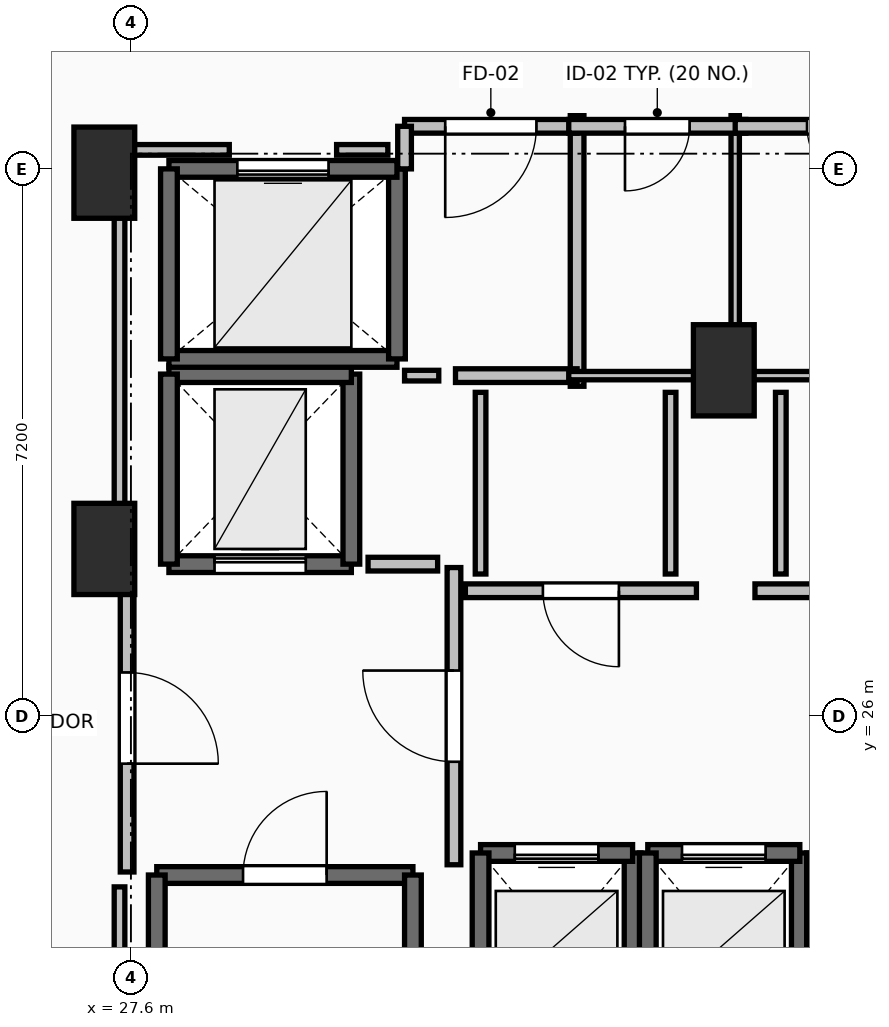
"""IFC4 building model, lengths in metres.
Left out: names, types, materials, properties, quantities, classifications, styles, units other than length and angle.
Written with IfcOpenShell. Run it as: python <this file> out.ifc"""

import sys

from ifc_helpers import new_model, si_unit, direction, frame, frame_2d, origin, origin_2d, place, context, subcontext, project, spatial, rectangle, extrude, element, fill, save


model = new_model("IFC4")
c1 = context("Model", 3, precision=1e-05, world=origin(), true_north=direction((0.0, 1.0)))
c2 = subcontext(c1, "Body", "Model", "MODEL_VIEW")
j1 = project(units=[si_unit("LENGTHUNIT", "METRE"), si_unit("PLANEANGLEUNIT", "RADIAN")], contexts=[c1])
p1 = place(None, origin())
s1 = spatial("IfcSite", under=j1, at=p1, CompositionType="ELEMENT")
p2 = place(p1, origin())
s2 = spatial("IfcBuilding", under=s1, at=p2, CompositionType="ELEMENT")
p3 = place(p2, frame((0.0, 0.0, 157.1)))
s3 = spatial("IfcBuildingStorey", under=s2, at=p3, CompositionType="ELEMENT", Elevation=157.1)
for number, where, z_axis, x_axis in (
    (1, (27.25, 28.2, 0.0), (0.0, 0.0, 1.0), (1.0, 0.0, 0.0)),
    (2, (27.25, 33.15, 0.0), (0.0, 0.0, 1.0), (1.0, 0.0, 0.0)),
    (3, (35.4, 30.55, 0.0), (0.0, 0.0, 1.0), (1.0, 0.0, 0.0)),
):
    element("IfcColumn", number, at=place(p3, frame(where, z_axis=z_axis, x_axis=x_axis)), inside=s3, PredefinedType="PILASTER", context=c2, shape_type="SweptSolid", body=[
        extrude(rectangle(XDim=0.8, YDim=1.2, at=origin_2d()), origin(), (0.0, 0.0, 1.0), 3.5),
    ])
p4 = place(p3, frame((27.94, 23.91, 0.0), z_axis=(0.0, 0.0, 1.0), x_axis=(1.0, 0.0, 0.0)))
e4 = element("IfcWall", 4, at=p4, inside=s3, PredefinedType="SOLIDWALL", context=c2, shape_type="SweptSolid", body=[
    extrude(rectangle(XDim=3.37, YDim=0.22, at=frame_2d((1.685, 0.0))), origin(), (0.0, 0.0, 1.0), 3.24),
])
p5 = place(p4, frame((1.135, 0.0, 0.0)))
e5 = element("IfcOpeningElement", 5, at=p5, cuts=e4, PredefinedType="OPENING", context=c2, shape_type="SweptSolid", body=[
    extrude(rectangle(XDim=1.1, YDim=2.15, at=frame_2d((0.55, 1.075))), frame((0.0, 0.125, 0.0), z_axis=(0.0, -1.0, 0.0), x_axis=(1.0, 0.0, 0.0)), (0.0, 0.0, 1.0), 0.25),
])
for number, where, z_axis, x_axis in (
    (6, (31.31, 23.91, 0.0), (0.0, 0.0, 1.0), (0.0, -1.0, 0.0)),
    (7, (27.94, 16.49, 0.0), (0.0, 0.0, 1.0), (0.0, 1.0, 0.0)),
):
    element("IfcWall", number, at=place(p3, frame(where, z_axis=z_axis, x_axis=x_axis)), inside=s3, PredefinedType="SOLIDWALL", context=c2, shape_type="SweptSolid", body=[
        extrude(rectangle(XDim=7.42, YDim=0.22, at=frame_2d((3.71, 0.0))), origin(), (0.0, 0.0, 1.0), 3.24),
    ])
p6 = place(p3, frame((34.2, 21.8, 0.0), z_axis=(0.0, 0.0, 1.0), x_axis=(0.0, 1.0, 0.0)))
e8 = element("IfcWall", 8, at=p6, inside=s3, PredefinedType="SOLIDWALL", context=c2, shape_type="SweptSolid", body=[
    extrude(rectangle(XDim=2.4, YDim=0.22, at=frame_2d((1.2, 0.0))), origin(), (0.0, 0.0, 1.0), 3.24),
])
p7 = place(p3, frame((34.2, 24.2, 0.0), z_axis=(0.0, 0.0, 1.0), x_axis=(-1.0, 0.0, 0.0)))
e9 = element("IfcWall", 9, at=p7, inside=s3, PredefinedType="SOLIDWALL", context=c2, shape_type="SweptSolid", body=[
    extrude(rectangle(XDim=2.0, YDim=0.22, at=frame_2d((1.0, 0.0))), origin(), (0.0, 0.0, 1.0), 3.24),
])
p8 = place(p7, frame((0.45, 0.0, 0.0)))
e10 = element("IfcOpeningElement", 10, at=p8, cuts=e9, PredefinedType="OPENING", context=c2, shape_type="SweptSolid", body=[
    extrude(rectangle(XDim=1.1, YDim=2.2, at=frame_2d((0.55, 1.1))), frame((0.0, 0.125, 0.0), z_axis=(0.0, -1.0, 0.0), x_axis=(1.0, 0.0, 0.0)), (0.0, 0.0, 1.0), 0.25),
])
for number, where, z_axis, x_axis in (
    (11, (32.2, 24.2, 0.0), (0.0, 0.0, 1.0), (0.0, -1.0, 0.0)),
    (12, (36.4, 21.8, 0.0), (0.0, 0.0, 1.0), (0.0, 1.0, 0.0)),
):
    element("IfcWall", number, at=place(p3, frame(where, z_axis=z_axis, x_axis=x_axis)), inside=s3, PredefinedType="SOLIDWALL", context=c2, shape_type="SweptSolid", body=[
        extrude(rectangle(XDim=2.4, YDim=0.22, at=frame_2d((1.2, 0.0))), origin(), (0.0, 0.0, 1.0), 3.24),
    ])
p9 = place(p3, frame((36.4, 24.2, 0.0), z_axis=(0.0, 0.0, 1.0), x_axis=(-1.0, 0.0, 0.0)))
e13 = element("IfcWall", 13, at=p9, inside=s3, PredefinedType="SOLIDWALL", context=c2, shape_type="SweptSolid", body=[
    extrude(rectangle(XDim=2.0, YDim=0.22, at=frame_2d((1.0, 0.0))), origin(), (0.0, 0.0, 1.0), 3.24),
])
p10 = place(p9, frame((0.45, 0.0, 0.0)))
e14 = element("IfcOpeningElement", 14, at=p10, cuts=e13, PredefinedType="OPENING", context=c2, shape_type="SweptSolid", body=[
    extrude(rectangle(XDim=1.1, YDim=2.2, at=frame_2d((0.55, 1.1))), frame((0.0, 0.125, 0.0), z_axis=(0.0, -1.0, 0.0), x_axis=(1.0, 0.0, 0.0)), (0.0, 0.0, 1.0), 0.25),
])
p11 = place(p3, frame((34.4, 24.2, 0.0), z_axis=(0.0, 0.0, 1.0), x_axis=(0.0, -1.0, 0.0)))
e15 = element("IfcWall", 15, at=p11, inside=s3, PredefinedType="SOLIDWALL", context=c2, shape_type="SweptSolid", body=[
    extrude(rectangle(XDim=2.4, YDim=0.22, at=frame_2d((1.2, 0.0))), origin(), (0.0, 0.0, 1.0), 3.24),
])
p12 = place(p3, frame((36.6, 24.2, 0.0), z_axis=(0.0, 0.0, 1.0), x_axis=(0.0, -1.0, 0.0)))
e16 = element("IfcWall", 16, at=p12, inside=s3, PredefinedType="SOLIDWALL", context=c2, shape_type="SweptSolid", body=[
    extrude(rectangle(XDim=2.6, YDim=0.22, at=frame_2d((1.3, 0.0))), origin(), (0.0, 0.0, 1.0), 3.24),
])
p13 = place(p3, frame((28.1, 28.0, 0.0), z_axis=(0.0, 0.0, 1.0), x_axis=(1.0, 0.0, 0.0)))
e17 = element("IfcWall", 17, at=p13, inside=s3, PredefinedType="SHEAR", context=c2, shape_type="SweptSolid", body=[
    extrude(rectangle(XDim=2.4, YDim=0.22, at=frame_2d((1.2, 0.0))), origin(), (0.0, 0.0, 1.0), 3.24),
])
p14 = place(p13, frame((0.6, 0.0, 0.0)))
e18 = element("IfcOpeningElement", 18, at=p14, cuts=e17, PredefinedType="OPENING", context=c2, shape_type="SweptSolid", body=[
    extrude(rectangle(XDim=1.2, YDim=2.2, at=frame_2d((0.6, 1.1))), frame((0.0, 0.125, 0.0), z_axis=(0.0, -1.0, 0.0), x_axis=(1.0, 0.0, 0.0)), (0.0, 0.0, 1.0), 0.25),
])
p15 = place(p3, frame((30.5, 28.0, 0.0), z_axis=(0.0, 0.0, 1.0), x_axis=(0.0, 1.0, 0.0)))
e19 = element("IfcWall", 19, at=p15, inside=s3, PredefinedType="SHEAR", context=c2, shape_type="SweptSolid", body=[
    extrude(rectangle(XDim=2.5, YDim=0.22, at=frame_2d((1.25, 0.0))), origin(), (0.0, 0.0, 1.0), 3.24),
])
p16 = place(p3, frame((30.5, 30.5, 0.0), z_axis=(0.0, 0.0, 1.0), x_axis=(-1.0, 0.0, 0.0)))
e20 = element("IfcWall", 20, at=p16, inside=s3, PredefinedType="SHEAR", context=c2, shape_type="SweptSolid", body=[
    extrude(rectangle(XDim=2.4, YDim=0.22, at=frame_2d((1.2, 0.0))), origin(), (0.0, 0.0, 1.0), 3.24),
])
p17 = place(p3, frame((28.1, 30.5, 0.0), z_axis=(0.0, 0.0, 1.0), x_axis=(0.0, -1.0, 0.0)))
e21 = element("IfcWall", 21, at=p17, inside=s3, PredefinedType="SHEAR", context=c2, shape_type="SweptSolid", body=[
    extrude(rectangle(XDim=2.5, YDim=0.22, at=frame_2d((1.25, 0.0))), origin(), (0.0, 0.0, 1.0), 3.24),
])
p18 = place(p3, frame((28.1, 30.7, 0.0), z_axis=(0.0, 0.0, 1.0), x_axis=(1.0, 0.0, 0.0)))
e22 = element("IfcWall", 22, at=p18, inside=s3, PredefinedType="SOLIDWALL", context=c2, shape_type="SweptSolid", body=[
    extrude(rectangle(XDim=3.0, YDim=0.22, at=frame_2d((1.5, 0.0))), origin(), (0.0, 0.0, 1.0), 3.24),
])
p19 = place(p3, frame((31.1, 30.7, 0.0), z_axis=(0.0, 0.0, 1.0), x_axis=(0.0, 1.0, 0.0)))
e23 = element("IfcWall", 23, at=p19, inside=s3, PredefinedType="SOLIDWALL", context=c2, shape_type="SweptSolid", body=[
    extrude(rectangle(XDim=2.5, YDim=0.22, at=frame_2d((1.25, 0.0))), origin(), (0.0, 0.0, 1.0), 3.24),
])
p20 = place(p3, frame((31.1, 33.2, 0.0), z_axis=(0.0, 0.0, 1.0), x_axis=(-1.0, 0.0, 0.0)))
e24 = element("IfcWall", 24, at=p20, inside=s3, PredefinedType="SOLIDWALL", context=c2, shape_type="SweptSolid", body=[
    extrude(rectangle(XDim=3.0, YDim=0.22, at=frame_2d((1.5, 0.0))), origin(), (0.0, 0.0, 1.0), 3.24),
])
p21 = place(p20, frame((0.9, 0.0, 0.0)))
e25 = element("IfcOpeningElement", 25, at=p21, cuts=e24, PredefinedType="OPENING", context=c2, shape_type="SweptSolid", body=[
    extrude(rectangle(XDim=1.2, YDim=2.2, at=frame_2d((0.6, 1.1))), frame((0.0, 0.125, 0.0), z_axis=(0.0, -1.0, 0.0), x_axis=(1.0, 0.0, 0.0)), (0.0, 0.0, 1.0), 0.25),
])
p22 = place(p3, frame((28.1, 33.2, 0.0), z_axis=(0.0, 0.0, 1.0), x_axis=(0.0, -1.0, 0.0)))
e26 = element("IfcWall", 26, at=p22, inside=s3, PredefinedType="SOLIDWALL", context=c2, shape_type="SweptSolid", body=[
    extrude(rectangle(XDim=2.5, YDim=0.22, at=frame_2d((1.25, 0.0))), origin(), (0.0, 0.0, 1.0), 3.24),
])
p23 = place(p3, frame((31.85, 24.045, 0.0), z_axis=(0.0, 0.0, 1.0), x_axis=(0.0, 1.0, 0.0)))
e27 = element("IfcWall", 27, at=p23, inside=s3, PredefinedType="PARTITIONING", context=c2, shape_type="SweptSolid", body=[
    extrude(rectangle(XDim=3.91, YDim=0.18, at=frame_2d((1.955, 0.0))), origin(), (0.0, 0.0, 1.0), 3.24),
])
p24 = place(p23, frame((1.355, 0.0, 0.0)))
e28 = element("IfcOpeningElement", 28, at=p24, cuts=e27, PredefinedType="OPENING", context=c2, shape_type="SweptSolid", body=[
    extrude(rectangle(XDim=1.2, YDim=2.15, at=frame_2d((0.6, 1.075))), frame((0.0, 0.105, 0.0), z_axis=(0.0, -1.0, 0.0), x_axis=(1.0, 0.0, 0.0)), (0.0, 0.0, 1.0), 0.21),
])
p25 = place(p3, frame((27.55, 28.0, 0.0), z_axis=(0.0, 0.0, 1.0), x_axis=(0.0, -1.0, 0.0)))
e29 = element("IfcWall", 29, at=p25, inside=s3, PredefinedType="PARTITIONING", context=c2, shape_type="SweptSolid", body=[
    extrude(rectangle(XDim=4.05, YDim=0.18, at=frame_2d((2.025, 0.0))), origin(), (0.0, 0.0, 1.0), 3.24),
])
p26 = place(p25, frame((1.425, 0.0, 0.0)))
e30 = element("IfcOpeningElement", 30, at=p26, cuts=e29, PredefinedType="OPENING", context=c2, shape_type="SweptSolid", body=[
    extrude(rectangle(XDim=1.2, YDim=2.15, at=frame_2d((0.6, 1.075))), frame((0.0, 0.105, 0.0), z_axis=(0.0, -1.0, 0.0), x_axis=(1.0, 0.0, 0.0)), (0.0, 0.0, 1.0), 0.21),
])
p27 = place(p3, frame((33.47, 30.34, 0.0), z_axis=(0.0, 0.0, 1.0), x_axis=(0.0, 1.0, 0.0)))
e31 = element("IfcWall", 31, at=p27, inside=s3, PredefinedType="PARTITIONING", context=c2, shape_type="SweptSolid", body=[
    extrude(rectangle(XDim=3.56, YDim=0.18, at=frame_2d((1.78, 0.0))), origin(), (0.0, 0.0, 1.0), 3.24),
])
p28 = place(p3, frame((31.87, 30.48, 0.0), z_axis=(0.0, 0.0, 1.0), x_axis=(1.0, 0.0, 0.0)))
e32 = element("IfcWall", 32, at=p28, inside=s3, PredefinedType="PARTITIONING", context=c2, shape_type="SweptSolid", body=[
    extrude(rectangle(XDim=1.6, YDim=0.18, at=frame_2d((0.8, 0.0))), origin(), (0.0, 0.0, 1.0), 3.24),
])
p29 = place(p3, frame((33.47, 33.76, 0.0), z_axis=(0.0, 0.0, 1.0), x_axis=(-1.0, 0.0, 0.0)))
e33 = element("IfcWall", 33, at=p29, inside=s3, PredefinedType="PARTITIONING", context=c2, shape_type="SweptSolid", body=[
    extrude(rectangle(XDim=2.27, YDim=0.18, at=frame_2d((1.135, 0.0))), origin(), (0.0, 0.0, 1.0), 3.24),
])
p30 = place(p29, frame((0.535, 0.0, 0.0)))
e34 = element("IfcOpeningElement", 34, at=p30, cuts=e33, PredefinedType="OPENING", context=c2, shape_type="SweptSolid", body=[
    extrude(rectangle(XDim=1.2, YDim=2.15, at=frame_2d((0.6, 1.075))), frame((0.0, 0.105, 0.0), z_axis=(0.0, -1.0, 0.0), x_axis=(1.0, 0.0, 0.0)), (0.0, 0.0, 1.0), 0.21),
])
p31 = place(p3, frame((31.2, 33.76, 0.0), z_axis=(0.0, 0.0, 1.0), x_axis=(0.0, -1.0, 0.0)))
e35 = element("IfcWall", 35, at=p31, inside=s3, PredefinedType="PARTITIONING", context=c2, shape_type="SweptSolid", body=[
    extrude(rectangle(XDim=0.56, YDim=0.18, at=frame_2d((0.28, 0.0))), origin(), (0.0, 0.0, 1.0), 3.24),
])
p32 = place(p3, frame((35.04, 27.65, 0.0), z_axis=(0.0, 0.0, 1.0), x_axis=(-1.0, 0.0, 0.0)))
e36 = element("IfcWall", 36, at=p32, inside=s3, PredefinedType="PARTITIONING", context=c2, shape_type="SweptSolid", body=[
    extrude(rectangle(XDim=3.04, YDim=0.18, at=frame_2d((1.52, 0.0))), origin(), (0.0, 0.0, 1.0), 3.24),
])
p33 = place(p32, frame((1.02, 0.0, 0.0)))
e37 = element("IfcOpeningElement", 37, at=p33, cuts=e36, PredefinedType="OPENING", context=c2, shape_type="SweptSolid", body=[
    extrude(rectangle(XDim=1.0, YDim=2.15, at=frame_2d((0.5, 1.075))), frame((0.0, 0.105, 0.0), z_axis=(0.0, -1.0, 0.0), x_axis=(1.0, 0.0, 0.0)), (0.0, 0.0, 1.0), 0.21),
])
p34 = place(p3, frame((39.19, 27.65, 0.0), z_axis=(0.0, 0.0, 1.0), x_axis=(-1.0, 0.0, 0.0)))
e38 = element("IfcWall", 38, at=p34, inside=s3, PredefinedType="PARTITIONING", context=c2, shape_type="SweptSolid", body=[
    extrude(rectangle(XDim=3.38, YDim=0.18, at=frame_2d((1.69, 0.0))), origin(), (0.0, 0.0, 1.0), 3.24),
])
p35 = place(p34, frame((1.265, 0.0, 0.0)))
e39 = element("IfcOpeningElement", 39, at=p35, cuts=e38, PredefinedType="OPENING", context=c2, shape_type="SweptSolid", body=[
    extrude(rectangle(XDim=0.85, YDim=2.1, at=frame_2d((0.425, 1.05))), frame((0.0, 0.105, 0.0), z_axis=(0.0, -1.0, 0.0), x_axis=(1.0, 0.0, 0.0)), (0.0, 0.0, 1.0), 0.21),
])
p36 = place(p3, frame((35.55, 30.34, 0.0), z_axis=(0.0, 0.0, 1.0), x_axis=(0.0, 1.0, 0.0)))
e40 = element("IfcWall", 40, at=p36, inside=s3, PredefinedType="PARTITIONING", context=c2, shape_type="SweptSolid", body=[
    extrude(rectangle(XDim=3.56, YDim=0.11, at=frame_2d((1.78, 0.0))), origin(), (0.0, 0.0, 1.0), 2.432),
])
p37 = place(p3, frame((33.36, 30.48, 0.0), z_axis=(0.0, 0.0, 1.0), x_axis=(1.0, 0.0, 0.0)))
e41 = element("IfcWall", 41, at=p37, inside=s3, PredefinedType="PARTITIONING", context=c2, shape_type="SweptSolid", body=[
    extrude(rectangle(XDim=1.81, YDim=0.11, at=frame_2d((0.905, 0.0))), origin(), (0.0, 0.0, 1.0), 3.24),
])
p38 = place(p3, frame((35.69, 33.76, 0.0), z_axis=(0.0, 0.0, 1.0), x_axis=(-1.0, 0.0, 0.0)))
e42 = element("IfcWall", 42, at=p38, inside=s3, PredefinedType="PARTITIONING", context=c2, shape_type="SweptSolid", body=[
    extrude(rectangle(XDim=2.33, YDim=0.18, at=frame_2d((1.165, 0.0))), origin(), (0.0, 0.0, 1.0), 3.24),
])
p39 = place(p38, frame((0.74, 0.0, 0.0)))
e43 = element("IfcOpeningElement", 43, at=p39, cuts=e42, PredefinedType="OPENING", context=c2, shape_type="SweptSolid", body=[
    extrude(rectangle(XDim=0.85, YDim=2.1, at=frame_2d((0.425, 1.05))), frame((0.0, 0.105, 0.0), z_axis=(0.0, -1.0, 0.0), x_axis=(1.0, 0.0, 0.0)), (0.0, 0.0, 1.0), 0.21),
])
p40 = place(p3, frame((35.68, 30.48, 0.0), z_axis=(0.0, 0.0, 1.0), x_axis=(1.0, 0.0, 0.0)))
e44 = element("IfcWall", 44, at=p40, inside=s3, PredefinedType="PARTITIONING", context=c2, shape_type="SweptSolid", body=[
    extrude(rectangle(XDim=2.595, YDim=0.11, at=frame_2d((1.297, 0.0))), origin(), (0.0, 0.0, 1.0), 2.432),
])
p41 = place(p3, frame((38.29, 33.76, 0.0), z_axis=(0.0, 0.0, 1.0), x_axis=(-1.0, 0.0, 0.0)))
e45 = element("IfcWall", 45, at=p41, inside=s3, PredefinedType="PARTITIONING", context=c2, shape_type="SweptSolid", body=[
    extrude(rectangle(XDim=2.74, YDim=0.18, at=frame_2d((1.37, 0.0))), origin(), (0.0, 0.0, 1.0), 3.24),
])
p42 = place(p41, frame((0.945, 0.0, 0.0)))
e46 = element("IfcOpeningElement", 46, at=p42, cuts=e45, PredefinedType="OPENING", context=c2, shape_type="SweptSolid", body=[
    extrude(rectangle(XDim=0.85, YDim=2.1, at=frame_2d((0.425, 1.05))), frame((0.0, 0.105, 0.0), z_axis=(0.0, -1.0, 0.0), x_axis=(1.0, 0.0, 0.0)), (0.0, 0.0, 1.0), 0.21),
])
p43 = place(p3, frame((31.635, 28.0, 0.0), z_axis=(0.0, 0.0, 1.0), x_axis=(-1.0, 0.0, 0.0)))
e47 = element("IfcWall", 47, at=p43, inside=s3, PredefinedType="PARTITIONING", context=c2, shape_type="SweptSolid", body=[
    extrude(rectangle(XDim=0.915, YDim=0.18, at=frame_2d((0.458, 0.0))), origin(), (0.0, 0.0, 1.0), 3.24),
])
p44 = place(p3, frame((31.2, 30.48, 0.0), z_axis=(0.0, 0.0, 1.0), x_axis=(1.0, 0.0, 0.0)))
e48 = element("IfcWall", 48, at=p44, inside=s3, PredefinedType="PARTITIONING", context=c2, shape_type="SweptSolid", body=[
    extrude(rectangle(XDim=0.45, YDim=0.14, at=frame_2d((0.225, 0.0))), origin(), (0.0, 0.0, 1.0), 3.24),
])
for number, where, z_axis, x_axis in (
    (49, (32.2, 30.26, 0.0), (0.0, 0.0, 1.0), (0.0, -1.0, 0.0)),
    (50, (34.7, 27.87, 0.0), (0.0, 0.0, 1.0), (0.0, 1.0, 0.0)),
    (51, (36.15, 30.26, 0.0), (0.0, 0.0, 1.0), (0.0, -1.0, 0.0)),
):
    element("IfcWall", number, at=place(p3, frame(where, z_axis=z_axis, x_axis=x_axis)), inside=s3, PredefinedType="PARTITIONING", context=c2, shape_type="SweptSolid", body=[
        extrude(rectangle(XDim=2.39, YDim=0.14, at=frame_2d((1.195, 0.0))), origin(), (0.0, 0.0, 1.0), 3.24),
    ])
p45 = place(p3, frame((30.98, 33.45, 0.0), z_axis=(0.0, 0.0, 1.0), x_axis=(-1.0, 0.0, 0.0)))
e52 = element("IfcWall", 52, at=p45, inside=s3, PredefinedType="PARTITIONING", context=c2, shape_type="SweptSolid", body=[
    extrude(rectangle(XDim=0.674, YDim=0.14, at=frame_2d((0.337, 0.0))), origin(), (0.0, 0.0, 1.0), 3.24),
])
p46 = place(p3, frame((28.894, 33.45, 0.0), z_axis=(0.0, 0.0, 1.0), x_axis=(-1.0, 0.0, 0.0)))
e53 = element("IfcWall", 53, at=p46, inside=s3, PredefinedType="PARTITIONING", context=c2, shape_type="SweptSolid", body=[
    extrude(rectangle(XDim=1.444, YDim=0.14, at=frame_2d((0.722, 0.0))), origin(), (0.0, 0.0, 1.0), 2.432),
])
p47 = place(p3, frame((27.45, 33.45, 0.0), z_axis=(0.0, 0.0, 1.0), x_axis=(0.0, -1.0, 0.0)))
e54 = element("IfcWall", 54, at=p47, inside=s3, PredefinedType="PARTITIONING", context=c2, shape_type="SweptSolid", body=[
    extrude(rectangle(XDim=5.254, YDim=0.14, at=frame_2d((2.627, 0.0))), origin(), (0.0, 0.0, 1.0), 2.432),
])
p48 = place(p3, frame((27.45, 23.754, 0.0), z_axis=(0.0, 0.0, 1.0), x_axis=(0.0, -1.0, 0.0)))
e55 = element("IfcWall", 55, at=p48, inside=s3, PredefinedType="PARTITIONING", context=c2, shape_type="SweptSolid", body=[
    extrude(rectangle(XDim=7.514, YDim=0.14, at=frame_2d((3.757, 0.0))), origin(), (0.0, 0.0, 1.0), 2.432),
])
p49 = place(p5, origin())
e56 = element("IfcDoor", 56, at=p49, inside=s3, OperationType="SINGLE_SWING_RIGHT", PredefinedType="DOOR", context=c2, shape_type="SweptSolid", body=[
    extrude(rectangle(XDim=1.1, YDim=2.15, at=frame_2d((0.55, 1.075))), frame((0.0, 0.025, 0.0), z_axis=(0.0, -1.0, 0.0), x_axis=(1.0, 0.0, 0.0)), (0.0, 0.0, 1.0), 0.05),
])
fill(e5, e56)
p50 = place(p8, origin())
e57 = element("IfcDoor", 57, at=p50, inside=s3, OperationType="SLIDING_TO_LEFT", PredefinedType="DOOR", context=c2, shape_type="SweptSolid", body=[
    extrude(rectangle(XDim=1.1, YDim=2.2, at=frame_2d((0.55, 1.1))), frame((0.0, 0.025, 0.0), z_axis=(0.0, -1.0, 0.0), x_axis=(1.0, 0.0, 0.0)), (0.0, 0.0, 1.0), 0.05),
])
fill(e10, e57)
p51 = place(p10, origin())
e58 = element("IfcDoor", 58, at=p51, inside=s3, OperationType="SLIDING_TO_LEFT", PredefinedType="DOOR", context=c2, shape_type="SweptSolid", body=[
    extrude(rectangle(XDim=1.1, YDim=2.2, at=frame_2d((0.55, 1.1))), frame((0.0, 0.025, 0.0), z_axis=(0.0, -1.0, 0.0), x_axis=(1.0, 0.0, 0.0)), (0.0, 0.0, 1.0), 0.05),
])
fill(e14, e58)
p52 = place(p14, origin())
e59 = element("IfcDoor", 59, at=p52, inside=s3, OperationType="SLIDING_TO_LEFT", PredefinedType="DOOR", context=c2, shape_type="SweptSolid", body=[
    extrude(rectangle(XDim=1.2, YDim=2.2, at=frame_2d((0.6, 1.1))), frame((0.0, 0.025, 0.0), z_axis=(0.0, -1.0, 0.0), x_axis=(1.0, 0.0, 0.0)), (0.0, 0.0, 1.0), 0.05),
])
fill(e18, e59)
p53 = place(p21, origin())
e60 = element("IfcDoor", 60, at=p53, inside=s3, OperationType="SLIDING_TO_LEFT", PredefinedType="DOOR", context=c2, shape_type="SweptSolid", body=[
    extrude(rectangle(XDim=1.2, YDim=2.2, at=frame_2d((0.6, 1.1))), frame((0.0, 0.025, 0.0), z_axis=(0.0, -1.0, 0.0), x_axis=(1.0, 0.0, 0.0)), (0.0, 0.0, 1.0), 0.05),
])
fill(e25, e60)
p54 = place(p24, origin())
e61 = element("IfcDoor", 61, at=p54, inside=s3, OperationType="SINGLE_SWING_RIGHT", PredefinedType="DOOR", context=c2, shape_type="SweptSolid", body=[
    extrude(rectangle(XDim=1.2, YDim=2.15, at=frame_2d((0.6, 1.075))), frame((0.0, 0.025, 0.0), z_axis=(0.0, -1.0, 0.0), x_axis=(1.0, 0.0, 0.0)), (0.0, 0.0, 1.0), 0.05),
])
fill(e28, e61)
p55 = place(p26, origin())
e62 = element("IfcDoor", 62, at=p55, inside=s3, OperationType="SINGLE_SWING_RIGHT", PredefinedType="DOOR", context=c2, shape_type="SweptSolid", body=[
    extrude(rectangle(XDim=1.2, YDim=2.15, at=frame_2d((0.6, 1.075))), frame((0.0, 0.025, 0.0), z_axis=(0.0, -1.0, 0.0), x_axis=(1.0, 0.0, 0.0)), (0.0, 0.0, 1.0), 0.05),
])
fill(e30, e62)
p56 = place(p30, origin())
e63 = element("IfcDoor", 63, at=p56, inside=s3, OperationType="SINGLE_SWING_RIGHT", PredefinedType="DOOR", context=c2, shape_type="SweptSolid", body=[
    extrude(rectangle(XDim=1.2, YDim=2.15, at=frame_2d((0.6, 1.075))), frame((0.0, 0.025, 0.0), z_axis=(0.0, -1.0, 0.0), x_axis=(1.0, 0.0, 0.0)), (0.0, 0.0, 1.0), 0.05),
])
fill(e34, e63)
p57 = place(p33, origin())
e64 = element("IfcDoor", 64, at=p57, inside=s3, OperationType="SINGLE_SWING_LEFT", PredefinedType="DOOR", context=c2, shape_type="SweptSolid", body=[
    extrude(rectangle(XDim=1.0, YDim=2.15, at=frame_2d((0.5, 1.075))), frame((0.0, 0.025, 0.0), z_axis=(0.0, -1.0, 0.0), x_axis=(1.0, 0.0, 0.0)), (0.0, 0.0, 1.0), 0.05),
])
fill(e37, e64)
p58 = place(p39, origin())
e65 = element("IfcDoor", 65, at=p58, inside=s3, OperationType="SINGLE_SWING_RIGHT", PredefinedType="DOOR", context=c2, shape_type="SweptSolid", body=[
    extrude(rectangle(XDim=0.85, YDim=2.1, at=frame_2d((0.425, 1.05))), frame((0.0, 0.025, 0.0), z_axis=(0.0, -1.0, 0.0), x_axis=(1.0, 0.0, 0.0)), (0.0, 0.0, 1.0), 0.05),
])
fill(e43, e65)
p59 = place(p42, origin())
e66 = element("IfcDoor", 66, at=p59, inside=s3, OperationType="SINGLE_SWING_LEFT", PredefinedType="DOOR", context=c2, shape_type="SweptSolid", body=[
    extrude(rectangle(XDim=0.85, YDim=2.1, at=frame_2d((0.425, 1.05))), frame((0.0, 0.025, 0.0), z_axis=(0.0, -1.0, 0.0), x_axis=(1.0, 0.0, 0.0)), (0.0, 0.0, 1.0), 0.05),
])
fill(e46, e66)
save(model, sys.argv[1])
